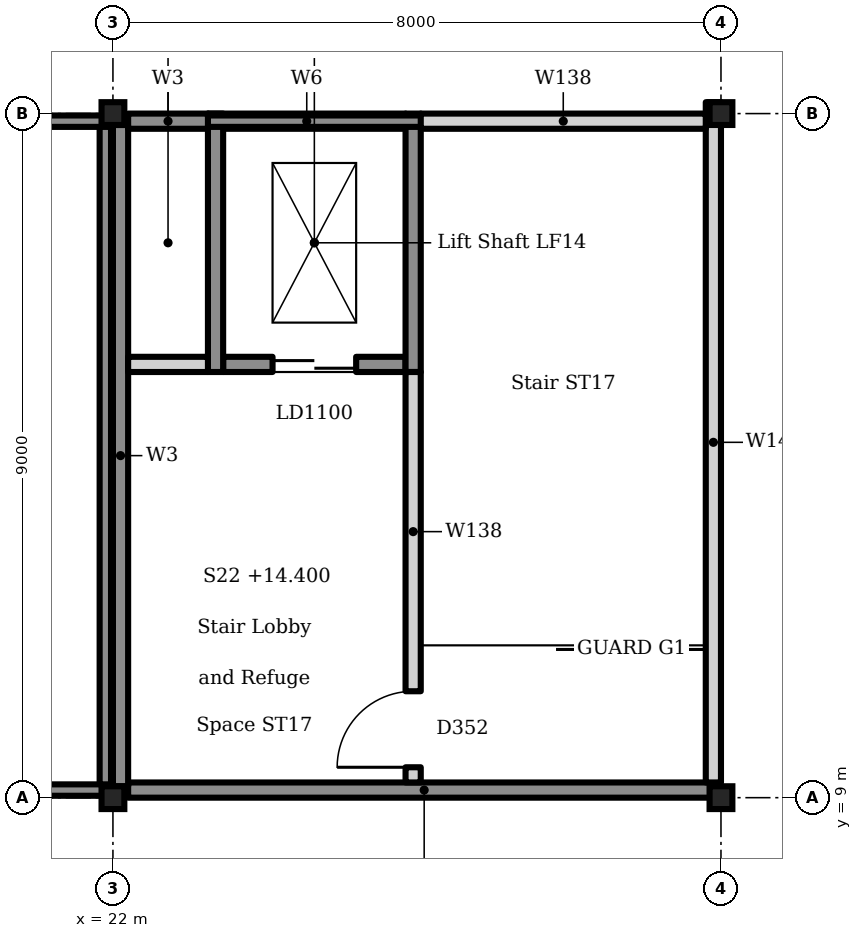
"""IFC4 building model, lengths in metres.
Left out: names, types, materials, properties, quantities, classifications, styles, units other than length and angle.
Written with IfcOpenShell. Run it as: python <this file> out.ifc"""

import sys

from ifc_helpers import new_model, si_unit, direction, frame, frame_2d, origin, origin_2d, place, context, subcontext, project, spatial, rectangle, i_section, extrude, element, fill, save


model = new_model("IFC4")
c1 = context("Model", 3, precision=1e-05, world=origin(), true_north=direction((0.0, 1.0)))
c2 = subcontext(c1, "Body", "Model", "MODEL_VIEW")
j1 = project(units=[si_unit("LENGTHUNIT", "METRE"), si_unit("PLANEANGLEUNIT", "RADIAN")], contexts=[c1])
p1 = place(None, origin())
s1 = spatial("IfcSite", under=j1, at=p1, CompositionType="ELEMENT")
p2 = place(p1, origin())
s2 = spatial("IfcBuilding", under=s1, at=p2, CompositionType="ELEMENT")
p3 = place(p2, frame((0.0, 0.0, 14.4)))
s3 = spatial("IfcBuildingStorey", under=s2, at=p3, CompositionType="ELEMENT", Elevation=14.4)
p4 = place(p3, frame((23.25, 17.9, 0.0), z_axis=(0.0, 0.0, 1.0), x_axis=(1.0, 0.0, 0.0)))
e1 = element("IfcWall", 1, at=p4, inside=s3, PredefinedType="SOLIDWALL", context=c2, shape_type="SweptSolid", body=[
    extrude(rectangle(XDim=2.6, YDim=0.2, at=frame_2d((1.3, 0.0))), origin(), (0.0, 0.0, 1.0), 3.6),
])
p5 = place(p3, frame((23.45, 14.7, 0.0), z_axis=(0.0, 0.0, 1.0), x_axis=(1.0, 0.0, 0.0)))
e2 = element("IfcWall", 2, at=p5, inside=s3, PredefinedType="SOLIDWALL", context=c2, shape_type="SweptSolid", body=[
    extrude(rectangle(XDim=2.4, YDim=0.2, at=frame_2d((1.2, 0.0))), origin(), (0.0, 0.0, 1.0), 3.6),
])
p6 = place(p5, frame((0.65, 0.0, 0.0)))
e3 = element("IfcOpeningElement", 3, at=p6, cuts=e2, PredefinedType="OPENING", context=c2, shape_type="SweptSolid", body=[
    extrude(rectangle(XDim=1.1, YDim=2.1, at=frame_2d((0.55, 1.05))), frame((0.0, 0.11, 0.0), z_axis=(0.0, -1.0, 0.0), x_axis=(1.0, 0.0, 0.0)), (0.0, 0.0, 1.0), 0.22),
])
for number, where, z_axis, x_axis in (
    (4, (23.35, 14.6, 0.0), (0.0, 0.0, 1.0), (0.0, 1.0, 0.0)),
    (5, (25.95, 14.6, 0.0), (0.0, 0.0, 1.0), (0.0, 1.0, 0.0)),
):
    element("IfcWall", number, at=place(p3, frame(where, z_axis=z_axis, x_axis=x_axis)), inside=s3, PredefinedType="SOLIDWALL", context=c2, shape_type="SweptSolid", body=[
        extrude(rectangle(XDim=3.4, YDim=0.2, at=frame_2d((1.7, 0.0))), origin(), (0.0, 0.0, 1.0), 3.6),
    ])
for number, where, z_axis, x_axis in (
    (6, (22.0, 9.0, 0.0), (0.0, 0.0, 1.0), (1.0, 0.0, 0.0)),
    (7, (22.0, 18.0, 0.0), (0.0, 0.0, 1.0), (1.0, 0.0, 0.0)),
    (8, (30.0, 9.0, 0.0), (0.0, 0.0, 1.0), (1.0, 0.0, 0.0)),
    (9, (30.0, 18.0, 0.0), (0.0, 0.0, 1.0), (1.0, 0.0, 0.0)),
):
    element("IfcColumn", number, at=place(p3, frame(where, z_axis=z_axis, x_axis=x_axis)), inside=s3, PredefinedType="COLUMN", context=c2, shape_type="SweptSolid", body=[
        extrude(i_section(OverallWidth=0.3, OverallDepth=0.3, WebThickness=0.011, FlangeThickness=0.019, FilletRadius=0.027, at=origin_2d()), origin(), (0.0, 0.0, 1.0), 3.6),
    ])
p7 = place(p3, frame((13.9, 9.1, 0.0), z_axis=(0.0, 0.0, 1.0), x_axis=(1.0, 0.0, 0.0)))
e10 = element("IfcWall", 10, at=p7, inside=s3, PredefinedType="SOLIDWALL", context=c2, shape_type="SweptSolid", body=[
    extrude(rectangle(XDim=8.0, YDim=0.15, at=frame_2d((4.0, 0.0))), origin(), (0.0, 0.0, 1.0), 0.15),
])
p8 = place(p3, frame((14.1, 17.9, 0.0), z_axis=(0.0, 0.0, 1.0), x_axis=(1.0, 0.0, 0.0)))
e11 = element("IfcWall", 11, at=p8, inside=s3, PredefinedType="SOLIDWALL", context=c2, shape_type="SweptSolid", body=[
    extrude(rectangle(XDim=7.8, YDim=0.15, at=frame_2d((3.9, 0.0))), origin(), (0.0, 0.0, 1.0), 0.15),
])
p9 = place(p3, frame((21.9, 9.175, 0.0), z_axis=(0.0, 0.0, 1.0), x_axis=(0.0, 1.0, 0.0)))
e12 = element("IfcWall", 12, at=p9, inside=s3, PredefinedType="SOLIDWALL", context=c2, shape_type="SweptSolid", body=[
    extrude(rectangle(XDim=8.65, YDim=0.15, at=frame_2d((4.325, 0.0))), origin(), (0.0, 0.0, 1.0), 0.15),
])
for number, where, z_axis, x_axis in (
    (13, (22.1, 9.1, 3.85), (0.0, 0.0, 1.0), (1.0, 0.0, 0.0)),
    (14, (22.1, 17.9, 3.85), (0.0, 0.0, 1.0), (1.0, 0.0, 0.0)),
):
    element("IfcWall", number, at=place(p3, frame(where, z_axis=z_axis, x_axis=x_axis)), inside=s3, PredefinedType="SOLIDWALL", context=c2, shape_type="SweptSolid", body=[
        extrude(rectangle(XDim=7.8, YDim=0.15, at=frame_2d((3.9, 0.0))), origin(), (0.0, 0.0, 1.0), 0.15),
    ])
for number, where, z_axis, x_axis in (
    (15, (22.1, 9.175, 3.85), (0.0, 0.0, 1.0), (0.0, 1.0, 0.0)),
    (16, (29.9, 9.175, 3.85), (0.0, 0.0, 1.0), (0.0, 1.0, 0.0)),
):
    element("IfcWall", number, at=place(p3, frame(where, z_axis=z_axis, x_axis=x_axis)), inside=s3, PredefinedType="SOLIDWALL", context=c2, shape_type="SweptSolid", body=[
        extrude(rectangle(XDim=8.65, YDim=0.15, at=frame_2d((4.325, 0.0))), origin(), (0.0, 0.0, 1.0), 0.15),
    ])
p10 = place(p3, frame((22.2, 9.1, 0.0), z_axis=(0.0, 0.0, 1.0), x_axis=(1.0, 0.0, 0.0)))
e17 = element("IfcWall", 17, at=p10, inside=s3, PredefinedType="SOLIDWALL", context=c2, shape_type="SweptSolid", body=[
    extrude(rectangle(XDim=7.79, YDim=0.2, at=frame_2d((3.895, 0.0))), origin(), (0.0, 0.0, 1.0), 3.6),
])
p11 = place(p3, frame((29.9, 9.2, 0.0), z_axis=(0.0, 0.0, 1.0), x_axis=(0.0, 1.0, 0.0)))
e18 = element("IfcWall", 18, at=p11, inside=s3, PredefinedType="SOLIDWALL", context=c2, shape_type="SweptSolid", body=[
    extrude(rectangle(XDim=8.95, YDim=0.2, at=frame_2d((4.475, 0.0))), origin(), (0.0, 0.0, 1.0), 3.6),
])
p12 = place(p3, frame((22.1, 9.15, 0.0), z_axis=(0.0, 0.0, 1.0), x_axis=(0.0, 1.0, 0.0)))
e19 = element("IfcWall", 19, at=p12, inside=s3, PredefinedType="SOLIDWALL", context=c2, shape_type="SweptSolid", body=[
    extrude(rectangle(XDim=8.7, YDim=0.2, at=frame_2d((4.35, 0.0))), origin(), (0.0, 0.0, 1.0), 3.6),
])
p13 = place(p3, frame((22.2, 17.9, 0.0), z_axis=(0.0, 0.0, 1.0), x_axis=(1.0, 0.0, 0.0)))
e20 = element("IfcWall", 20, at=p13, inside=s3, PredefinedType="SOLIDWALL", context=c2, shape_type="SweptSolid", body=[
    extrude(rectangle(XDim=1.05, YDim=0.2, at=frame_2d((0.525, 0.0))), origin(), (0.0, 0.0, 1.0), 3.6),
])
p14 = place(p3, frame((26.05, 17.9, 0.0), z_axis=(0.0, 0.0, 1.0), x_axis=(1.0, 0.0, 0.0)))
e21 = element("IfcWall", 21, at=p14, inside=s3, PredefinedType="SOLIDWALL", context=c2, shape_type="SweptSolid", body=[
    extrude(rectangle(XDim=3.75, YDim=0.2, at=frame_2d((1.875, 0.0))), origin(), (0.0, 0.0, 1.0), 3.6),
])
p15 = place(p3, frame((25.95, 9.2, 0.0), z_axis=(0.0, 0.0, 1.0), x_axis=(0.0, 1.0, 0.0)))
e22 = element("IfcWall", 22, at=p15, inside=s3, PredefinedType="SOLIDWALL", context=c2, shape_type="SweptSolid", body=[
    extrude(rectangle(XDim=5.4, YDim=0.2, at=frame_2d((2.7, 0.0))), origin(), (0.0, 0.0, 1.0), 3.6),
])
p16 = place(p15, frame((0.2, 0.0, 0.0)))
e23 = element("IfcOpeningElement", 23, at=p16, cuts=e22, PredefinedType="OPENING", context=c2, shape_type="SweptSolid", body=[
    extrude(rectangle(XDim=1.0, YDim=2.1, at=frame_2d((0.5, 1.05))), frame((0.0, 0.11, 0.0), z_axis=(0.0, -1.0, 0.0), x_axis=(1.0, 0.0, 0.0)), (0.0, 0.0, 1.0), 0.22),
])
p17 = place(p3, frame((22.2, 14.7, 0.0), z_axis=(0.0, 0.0, 1.0), x_axis=(1.0, 0.0, 0.0)))
e24 = element("IfcWall", 24, at=p17, inside=s3, PredefinedType="SOLIDWALL", context=c2, shape_type="SweptSolid", body=[
    extrude(rectangle(XDim=1.05, YDim=0.2, at=frame_2d((0.525, 0.0))), origin(), (0.0, 0.0, 1.0), 3.6),
])
p18 = place(p6, origin())
e25 = element("IfcDoor", 25, at=p18, inside=s3, OperationType="SLIDING_TO_LEFT", PredefinedType="DOOR", context=c2, shape_type="SweptSolid", body=[
    extrude(rectangle(XDim=1.1, YDim=2.1, at=frame_2d((0.55, 1.05))), frame((0.0, 0.025, 0.0), z_axis=(0.0, -1.0, 0.0), x_axis=(1.0, 0.0, 0.0)), (0.0, 0.0, 1.0), 0.05),
])
fill(e3, e25)
p19 = place(p16, origin())
e26 = element("IfcDoor", 26, at=p19, inside=s3, OperationType="SINGLE_SWING_RIGHT", PredefinedType="DOOR", context=c2, shape_type="SweptSolid", body=[
    extrude(rectangle(XDim=1.0, YDim=2.1, at=frame_2d((0.5, 1.05))), frame((0.0, 0.025, 0.0), z_axis=(0.0, -1.0, 0.0), x_axis=(1.0, 0.0, 0.0)), (0.0, 0.0, 1.0), 0.05),
])
fill(e23, e26)
save(model, sys.argv[1])
